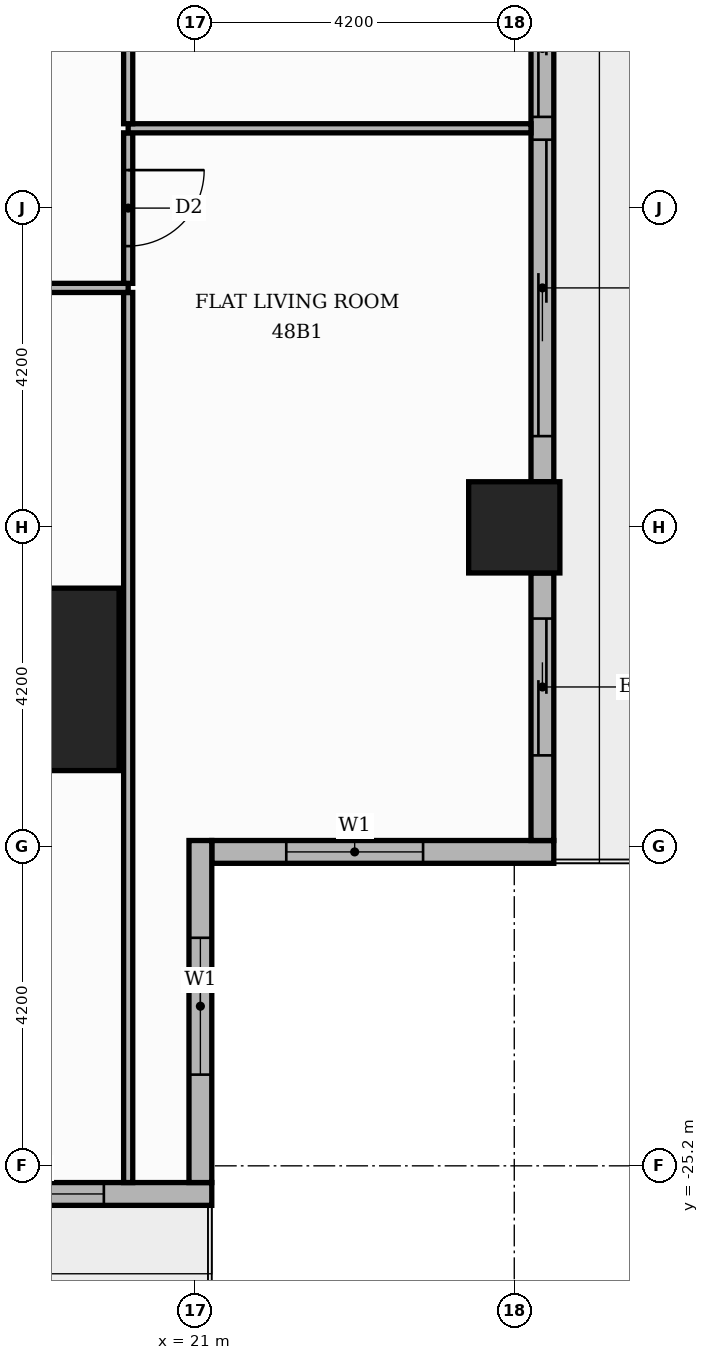
"""IFC4 building model, lengths in metres.
Left out: names, types, materials, properties, quantities, classifications, styles, units other than length and angle.
Written with IfcOpenShell. Run it as: python <this file> out.ifc"""

import sys

from ifc_helpers import new_model, si_unit, direction, frame, frame_2d, origin, origin_2d, place, context, subcontext, project, spatial, rectangle, extrude, element, fill, save


model = new_model("IFC4")
c1 = context("Model", 3, precision=1e-05, world=origin(), true_north=direction((0.0, 1.0)))
c2 = subcontext(c1, "Body", "Model", "MODEL_VIEW")
j1 = project(units=[si_unit("LENGTHUNIT", "METRE"), si_unit("PLANEANGLEUNIT", "RADIAN")], contexts=[c1])
p1 = place(None, origin())
s1 = spatial("IfcSite", under=j1, at=p1, CompositionType="ELEMENT")
p2 = place(p1, origin())
s2 = spatial("IfcBuilding", under=s1, at=p2, CompositionType="ELEMENT")
p3 = place(p2, frame((0.0, 0.0, 204.0)))
s3 = spatial("IfcBuildingStorey", under=s2, at=p3, CompositionType="ELEMENT", Elevation=204.0)
p4 = place(p3, frame((18.8, -18.8, 0.0), z_axis=(0.0, 0.0, 1.0), x_axis=(1.0, 0.0, 0.0)))
e1 = element("IfcColumn", 1, at=p4, inside=s3, PredefinedType="COLUMN", context=c2, shape_type="SweptSolid", body=[
    extrude(rectangle(XDim=2.4, YDim=2.4, at=origin_2d()), origin(), (0.0, 0.0, 1.0), 3.9),
])
p5 = place(p3, frame((25.2, -16.8, 0.0), z_axis=(0.0, 0.0, 1.0), x_axis=(1.0, 0.0, 0.0)))
e2 = element("IfcColumn", 2, at=p5, inside=s3, PredefinedType="COLUMN", context=c2, shape_type="SweptSolid", body=[
    extrude(rectangle(XDim=1.2, YDim=1.2, at=origin_2d()), origin(), (0.0, 0.0, 1.0), 3.9),
])
p6 = place(p3, frame((21.22, -21.07, 0.0), z_axis=(0.0, 0.0, 1.0), x_axis=(1.0, 0.0, 0.0)))
e3 = element("IfcWall", 3, at=p6, inside=s3, PredefinedType="STANDARD", context=c2, shape_type="SweptSolid", body=[
    extrude(rectangle(XDim=4.5, YDim=0.3, at=frame_2d((2.25, 0.0))), origin(), (0.0, 0.0, 1.0), 3.48),
])
p7 = place(p6, frame((0.98, 0.0, 0.9)))
e4 = element("IfcOpeningElement", 4, at=p7, cuts=e3, PredefinedType="OPENING", context=c2, shape_type="SweptSolid", body=[
    extrude(rectangle(XDim=1.8, YDim=2.1, at=frame_2d((0.9, 1.05))), frame((0.0, 0.16, 0.0), z_axis=(0.0, -1.0, 0.0), x_axis=(1.0, 0.0, 0.0)), (0.0, 0.0, 1.0), 0.32),
])
p8 = place(p3, frame((25.57, -20.92, 0.0), z_axis=(0.0, 0.0, 1.0), x_axis=(0.0, 1.0, 0.0)))
e5 = element("IfcWall", 5, at=p8, inside=s3, PredefinedType="STANDARD", context=c2, shape_type="SweptSolid", body=[
    extrude(rectangle(XDim=3.52, YDim=0.3, at=frame_2d((1.76, 0.0))), origin(), (0.0, 0.0, 1.0), 3.48),
])
p9 = place(p8, frame((1.12, 0.0, 0.0)))
e6 = element("IfcOpeningElement", 6, at=p9, cuts=e5, PredefinedType="OPENING", context=c2, shape_type="SweptSolid", body=[
    extrude(rectangle(XDim=1.8, YDim=2.4, at=frame_2d((0.9, 1.2))), frame((0.0, 0.16, 0.0), z_axis=(0.0, -1.0, 0.0), x_axis=(1.0, 0.0, 0.0)), (0.0, 0.0, 1.0), 0.32),
])
p10 = place(p3, frame((25.57, -16.2, 0.0), z_axis=(0.0, 0.0, 1.0), x_axis=(0.0, 1.0, 0.0)))
e7 = element("IfcWall", 7, at=p10, inside=s3, PredefinedType="STANDARD", context=c2, shape_type="SweptSolid", body=[
    extrude(rectangle(XDim=7.2, YDim=0.3, at=frame_2d((3.6, 0.0))), origin(), (0.0, 0.0, 1.0), 3.48),
])
p11 = place(p10, frame((0.6, 0.0, 0.0)))
e8 = element("IfcOpeningElement", 8, at=p11, cuts=e7, PredefinedType="OPENING", context=c2, shape_type="SweptSolid", body=[
    extrude(rectangle(XDim=3.9, YDim=2.4, at=frame_2d((1.95, 1.2))), frame((0.0, 0.16, 0.0), z_axis=(0.0, -1.0, 0.0), x_axis=(1.0, 0.0, 0.0)), (0.0, 0.0, 1.0), 0.32),
])
p12 = place(p10, frame((4.8, 0.0, 0.0)))
e9 = element("IfcOpeningElement", 9, at=p12, cuts=e7, PredefinedType="OPENING", context=c2, shape_type="SweptSolid", body=[
    extrude(rectangle(XDim=1.8, YDim=2.4, at=frame_2d((0.9, 1.2))), frame((0.0, 0.16, 0.0), z_axis=(0.0, -1.0, 0.0), x_axis=(1.0, 0.0, 0.0)), (0.0, 0.0, 1.0), 0.32),
])
p13 = place(p3, frame((17.4, -25.57, 0.0), z_axis=(0.0, 0.0, 1.0), x_axis=(1.0, 0.0, 0.0)))
e10 = element("IfcWall", 10, at=p13, inside=s3, PredefinedType="STANDARD", context=c2, shape_type="SweptSolid", body=[
    extrude(rectangle(XDim=3.82, YDim=0.3, at=frame_2d((1.91, 0.0))), origin(), (0.0, 0.0, 1.0), 3.48),
])
p14 = place(p13, frame((0.6, 0.0, 0.9)))
e11 = element("IfcOpeningElement", 11, at=p14, cuts=e10, PredefinedType="OPENING", context=c2, shape_type="SweptSolid", body=[
    extrude(rectangle(XDim=1.8, YDim=2.1, at=frame_2d((0.9, 1.05))), frame((0.0, 0.16, 0.0), z_axis=(0.0, -1.0, 0.0), x_axis=(1.0, 0.0, 0.0)), (0.0, 0.0, 1.0), 0.32),
])
p15 = place(p3, frame((21.07, -25.42, 0.0), z_axis=(0.0, 0.0, 1.0), x_axis=(0.0, 1.0, 0.0)))
e12 = element("IfcWall", 12, at=p15, inside=s3, PredefinedType="STANDARD", context=c2, shape_type="SweptSolid", body=[
    extrude(rectangle(XDim=4.5, YDim=0.3, at=frame_2d((2.25, 0.0))), origin(), (0.0, 0.0, 1.0), 3.48),
])
p16 = place(p15, frame((1.42, 0.0, 0.9)))
e13 = element("IfcOpeningElement", 13, at=p16, cuts=e12, PredefinedType="OPENING", context=c2, shape_type="SweptSolid", body=[
    extrude(rectangle(XDim=1.8, YDim=2.1, at=frame_2d((0.9, 1.05))), frame((0.0, 0.16, 0.0), z_axis=(0.0, -1.0, 0.0), x_axis=(1.0, 0.0, 0.0)), (0.0, 0.0, 1.0), 0.32),
])
p17 = place(p3, frame((20.12, -25.42, 0.0), z_axis=(0.0, 0.0, 1.0), x_axis=(0.0, 1.0, 0.0)))
e14 = element("IfcWall", 14, at=p17, inside=s3, PredefinedType="PARTITIONING", context=c2, shape_type="SweptSolid", body=[
    extrude(rectangle(XDim=11.71, YDim=0.12, at=frame_2d((5.855, 0.0))), origin(), (0.0, 0.0, 1.0), 3.48),
])
p18 = place(p3, frame((13.65, -13.65, 0.0), z_axis=(0.0, 0.0, 1.0), x_axis=(1.0, 0.0, 0.0)))
e15 = element("IfcWall", 15, at=p18, inside=s3, PredefinedType="PARTITIONING", context=c2, shape_type="SweptSolid", body=[
    extrude(rectangle(XDim=6.47, YDim=0.12, at=frame_2d((3.235, 0.0))), origin(), (0.0, 0.0, 1.0), 3.48),
])
p19 = place(p18, frame((2.785, 0.0, 0.0)))
e16 = element("IfcOpeningElement", 16, at=p19, cuts=e15, PredefinedType="OPENING", context=c2, shape_type="SweptSolid", body=[
    extrude(rectangle(XDim=0.9, YDim=2.1, at=frame_2d((0.45, 1.05))), frame((0.0, 0.07, 0.0), z_axis=(0.0, -1.0, 0.0), x_axis=(1.0, 0.0, 0.0)), (0.0, 0.0, 1.0), 0.14),
])
p20 = place(p3, frame((20.12, -13.59, 0.0), z_axis=(0.0, 0.0, 1.0), x_axis=(0.0, 1.0, 0.0)))
e17 = element("IfcWall", 17, at=p20, inside=s3, PredefinedType="PARTITIONING", context=c2, shape_type="SweptSolid", body=[
    extrude(rectangle(XDim=1.98, YDim=0.12, at=frame_2d((0.99, 0.0))), origin(), (0.0, 0.0, 1.0), 3.48),
])
p21 = place(p20, frame((0.49, 0.0, 0.0)))
e18 = element("IfcOpeningElement", 18, at=p21, cuts=e17, PredefinedType="OPENING", context=c2, shape_type="SweptSolid", body=[
    extrude(rectangle(XDim=1.0, YDim=2.1, at=frame_2d((0.5, 1.05))), frame((0.0, 0.07, 0.0), z_axis=(0.0, -1.0, 0.0), x_axis=(1.0, 0.0, 0.0)), (0.0, 0.0, 1.0), 0.14),
])
p22 = place(p3, frame((20.12, -11.55, 0.0), z_axis=(0.0, 0.0, 1.0), x_axis=(1.0, 0.0, 0.0)))
e19 = element("IfcWall", 19, at=p22, inside=s3, PredefinedType="PARTITIONING", context=c2, shape_type="SweptSolid", body=[
    extrude(rectangle(XDim=5.3, YDim=0.12, at=frame_2d((2.65, 0.0))), origin(), (0.0, 0.0, 1.0), 3.48),
])
p23 = place(p3, frame((20.12, -11.49, 0.0), z_axis=(0.0, 0.0, 1.0), x_axis=(0.0, 1.0, 0.0)))
e20 = element("IfcWall", 20, at=p23, inside=s3, PredefinedType="PARTITIONING", context=c2, shape_type="SweptSolid", body=[
    extrude(rectangle(XDim=4.08, YDim=0.12, at=frame_2d((2.04, 0.0))), origin(), (0.0, 0.0, 1.0), 3.48),
])
p24 = place(p23, frame((1.54, 0.0, 0.0)))
e21 = element("IfcOpeningElement", 21, at=p24, cuts=e20, PredefinedType="OPENING", context=c2, shape_type="SweptSolid", body=[
    extrude(rectangle(XDim=1.0, YDim=2.1, at=frame_2d((0.5, 1.05))), frame((0.0, 0.07, 0.0), z_axis=(0.0, -1.0, 0.0), x_axis=(1.0, 0.0, 0.0)), (0.0, 0.0, 1.0), 0.14),
])
p25 = place(p7, origin())
e22 = element("IfcWindow", 22, at=p25, inside=s3, PartitioningType="SINGLE_PANEL", PredefinedType="WINDOW", context=c2, shape_type="SweptSolid", body=[
    extrude(rectangle(XDim=1.8, YDim=2.1, at=frame_2d((0.9, 1.05))), frame((0.0, 0.03, 0.0), z_axis=(0.0, -1.0, 0.0), x_axis=(1.0, 0.0, 0.0)), (0.0, 0.0, 1.0), 0.06),
])
fill(e4, e22)
p26 = place(p9, origin())
e23 = element("IfcDoor", 23, at=p26, inside=s3, OperationType="SLIDING_TO_RIGHT", PredefinedType="DOOR", context=c2, shape_type="SweptSolid", body=[
    extrude(rectangle(XDim=1.8, YDim=2.4, at=frame_2d((0.9, 1.2))), frame((0.0, 0.025, 0.0), z_axis=(0.0, -1.0, 0.0), x_axis=(1.0, 0.0, 0.0)), (0.0, 0.0, 1.0), 0.05),
])
fill(e6, e23)
p27 = place(p11, origin())
e24 = element("IfcDoor", 24, at=p27, inside=s3, OperationType="SLIDING_TO_LEFT", PredefinedType="DOOR", context=c2, shape_type="SweptSolid", body=[
    extrude(rectangle(XDim=3.9, YDim=2.4, at=frame_2d((1.95, 1.2))), frame((0.0, 0.025, 0.0), z_axis=(0.0, -1.0, 0.0), x_axis=(1.0, 0.0, 0.0)), (0.0, 0.0, 1.0), 0.05),
])
fill(e8, e24)
p28 = place(p12, origin())
e25 = element("IfcDoor", 25, at=p28, inside=s3, OperationType="SLIDING_TO_RIGHT", PredefinedType="DOOR", context=c2, shape_type="SweptSolid", body=[
    extrude(rectangle(XDim=1.8, YDim=2.4, at=frame_2d((0.9, 1.2))), frame((0.0, 0.025, 0.0), z_axis=(0.0, -1.0, 0.0), x_axis=(1.0, 0.0, 0.0)), (0.0, 0.0, 1.0), 0.05),
])
fill(e9, e25)
p29 = place(p14, origin())
e26 = element("IfcWindow", 26, at=p29, inside=s3, PartitioningType="SINGLE_PANEL", PredefinedType="WINDOW", context=c2, shape_type="SweptSolid", body=[
    extrude(rectangle(XDim=1.8, YDim=2.1, at=frame_2d((0.9, 1.05))), frame((0.0, 0.03, 0.0), z_axis=(0.0, -1.0, 0.0), x_axis=(1.0, 0.0, 0.0)), (0.0, 0.0, 1.0), 0.06),
])
fill(e11, e26)
p30 = place(p16, origin())
e27 = element("IfcWindow", 27, at=p30, inside=s3, PartitioningType="SINGLE_PANEL", PredefinedType="WINDOW", context=c2, shape_type="SweptSolid", body=[
    extrude(rectangle(XDim=1.8, YDim=2.1, at=frame_2d((0.9, 1.05))), frame((0.0, 0.03, 0.0), z_axis=(0.0, -1.0, 0.0), x_axis=(1.0, 0.0, 0.0)), (0.0, 0.0, 1.0), 0.06),
])
fill(e13, e27)
p31 = place(p21, frame((1.0, 0.0, 0.0), z_axis=(0.0, 0.0, 1.0), x_axis=(-1.0, 0.0, 0.0)))
e28 = element("IfcDoor", 28, at=p31, inside=s3, OperationType="SINGLE_SWING_RIGHT", PredefinedType="DOOR", context=c2, shape_type="SweptSolid", body=[
    extrude(rectangle(XDim=1.0, YDim=2.1, at=frame_2d((0.5, 1.05))), frame((0.0, 0.025, 0.0), z_axis=(0.0, -1.0, 0.0), x_axis=(1.0, 0.0, 0.0)), (0.0, 0.0, 1.0), 0.05),
])
fill(e18, e28)
save(model, sys.argv[1])
